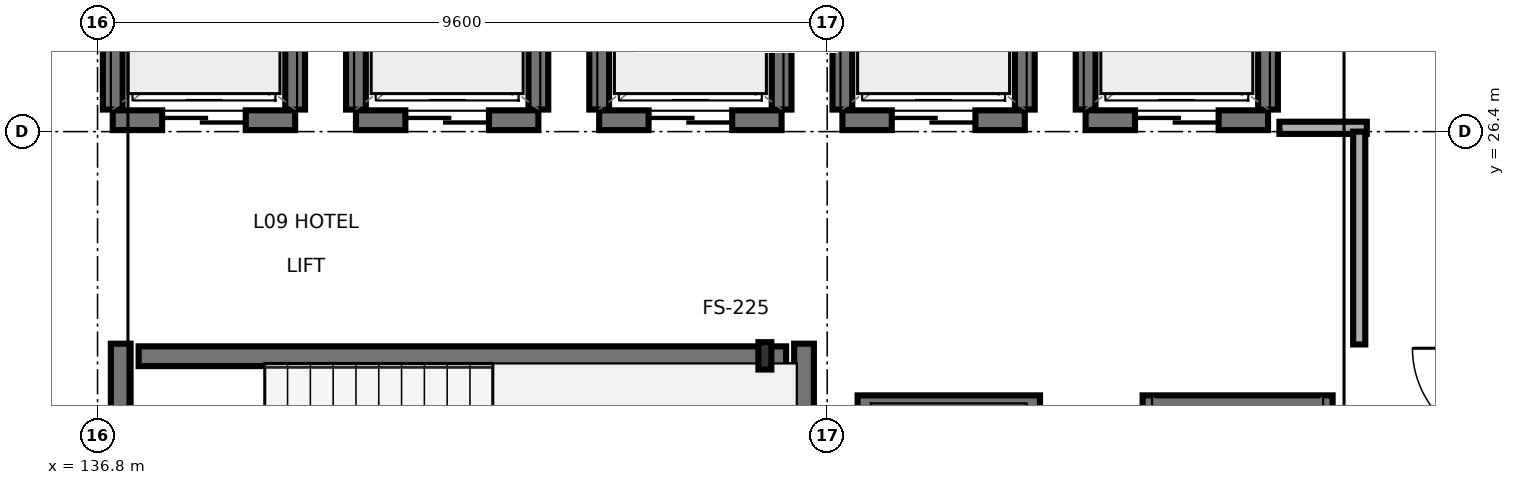
"""IFC4 building model, lengths in metres.
Left out: names, types, materials, properties, quantities, classifications, styles, units other than length and angle.
Written with IfcOpenShell. Run it as: python <this file> out.ifc"""

import sys

from ifc_helpers import new_model, si_unit, direction, frame, frame_2d, origin, origin_2d, place, context, subcontext, project, spatial, rectangle, i_section, extrude, element, fill, save


model = new_model("IFC4")
c1 = context("Model", 3, precision=1e-05, world=origin(), true_north=direction((0.0, 1.0)))
c2 = subcontext(c1, "Body", "Model", "MODEL_VIEW")
j1 = project(units=[si_unit("LENGTHUNIT", "METRE"), si_unit("PLANEANGLEUNIT", "RADIAN")], contexts=[c1])
p1 = place(None, origin())
s1 = spatial("IfcSite", under=j1, at=p1, CompositionType="ELEMENT")
p2 = place(p1, origin())
s2 = spatial("IfcBuilding", under=s1, at=p2, CompositionType="ELEMENT")
p3 = place(p2, frame((0.0, 0.0, 31.7)))
s3 = spatial("IfcBuildingStorey", under=s2, at=p3, CompositionType="ELEMENT", Elevation=31.7)
p4 = place(p3, frame((145.58, 23.45, 0.0), z_axis=(0.0, 0.0, 1.0), x_axis=(1.0, 0.0, 0.0)))
e1 = element("IfcColumn", 1, at=p4, inside=s3, PredefinedType="PILASTER", context=c2, shape_type="SweptSolid", body=[
    extrude(i_section(OverallWidth=0.17, OverallDepth=0.36, WebThickness=0.008, FlangeThickness=0.013, FilletRadius=0.018, at=origin_2d()), origin(), (0.0, 0.0, 1.0), 3.4),
])
p5 = place(p3, frame((137.105, 19.34, 0.0), z_axis=(0.0, 0.0, 1.0), x_axis=(0.0, 1.0, 0.0)))
e2 = element("IfcWall", 2, at=p5, inside=s3, PredefinedType="SHEAR", context=c2, shape_type="SweptSolid", body=[
    extrude(rectangle(XDim=4.27, YDim=0.26, at=frame_2d((2.135, 0.0))), origin(), (0.0, 0.0, 1.0), 3.17),
])
p6 = place(p5, frame((0.61, 0.0, 0.0)))
e3 = element("IfcOpeningElement", 3, at=p6, cuts=e2, PredefinedType="OPENING", context=c2, shape_type="SweptSolid", body=[
    extrude(rectangle(XDim=1.1, YDim=2.2, at=frame_2d((0.55, 1.1))), frame((0.0, 0.14, 0.0), z_axis=(0.0, -1.0, 0.0), x_axis=(1.0, 0.0, 0.0)), (0.0, 0.0, 1.0), 0.28),
])
p7 = place(p3, frame((146.095, 19.34, 0.0), z_axis=(0.0, 0.0, 1.0), x_axis=(0.0, 1.0, 0.0)))
e4 = element("IfcWall", 4, at=p7, inside=s3, PredefinedType="SHEAR", context=c2, shape_type="SweptSolid", body=[
    extrude(rectangle(XDim=4.27, YDim=0.26, at=frame_2d((2.135, 0.0))), origin(), (0.0, 0.0, 1.0), 3.17),
])
p8 = place(p3, frame((137.34, 23.445, 0.0), z_axis=(0.0, 0.0, 1.0), x_axis=(1.0, 0.0, 0.0)))
e5 = element("IfcWall", 5, at=p8, inside=s3, PredefinedType="SHEAR", context=c2, shape_type="SweptSolid", body=[
    extrude(rectangle(XDim=8.52, YDim=0.26, at=frame_2d((4.26, 0.0))), origin(), (0.0, 0.0, 1.0), 3.17),
])
p9 = place(p3, frame((137.0, 26.55, 0.0), z_axis=(0.0, 0.0, 1.0), x_axis=(1.0, 0.0, 0.0)))
e6 = element("IfcWall", 6, at=p9, inside=s3, PredefinedType="SHEAR", context=c2, shape_type="SweptSolid", body=[
    extrude(rectangle(XDim=2.4, YDim=0.26, at=frame_2d((1.2, 0.0))), origin(), (0.0, 0.0, 1.0), 2.705),
])
p10 = place(p9, frame((0.65, 0.0, 0.0)))
e7 = element("IfcOpeningElement", 7, at=p10, cuts=e6, PredefinedType="OPENING", context=c2, shape_type="SweptSolid", body=[
    extrude(rectangle(XDim=1.1, YDim=2.2, at=frame_2d((0.55, 1.1))), frame((0.0, 0.14, 0.0), z_axis=(0.0, -1.0, 0.0), x_axis=(1.0, 0.0, 0.0)), (0.0, 0.0, 1.0), 0.28),
])
for number, where, z_axis, x_axis in (
    (8, (137.0, 26.69, 0.0), (0.0, 0.0, 1.0), (0.0, 1.0, 0.0)),
    (9, (139.4, 26.69, 0.0), (0.0, 0.0, 1.0), (0.0, 1.0, 0.0)),
):
    element("IfcWall", number, at=place(p3, frame(where, z_axis=z_axis, x_axis=x_axis)), inside=s3, PredefinedType="SHEAR", context=c2, shape_type="SweptSolid", body=[
        extrude(rectangle(XDim=1.82, YDim=0.26, at=frame_2d((0.91, 0.0))), origin(), (0.0, 0.0, 1.0), 2.705),
    ])
p11 = place(p3, frame((140.2, 26.55, 0.0), z_axis=(0.0, 0.0, 1.0), x_axis=(1.0, 0.0, 0.0)))
e10 = element("IfcWall", 10, at=p11, inside=s3, PredefinedType="SHEAR", context=c2, shape_type="SweptSolid", body=[
    extrude(rectangle(XDim=2.4, YDim=0.26, at=frame_2d((1.2, 0.0))), origin(), (0.0, 0.0, 1.0), 3.17),
])
p12 = place(p11, frame((0.65, 0.0, 0.0)))
e11 = element("IfcOpeningElement", 11, at=p12, cuts=e10, PredefinedType="OPENING", context=c2, shape_type="SweptSolid", body=[
    extrude(rectangle(XDim=1.1, YDim=2.2, at=frame_2d((0.55, 1.1))), frame((0.0, 0.14, 0.0), z_axis=(0.0, -1.0, 0.0), x_axis=(1.0, 0.0, 0.0)), (0.0, 0.0, 1.0), 0.28),
])
for number, where, z_axis, x_axis in (
    (12, (140.2, 26.69, 0.0), (0.0, 0.0, 1.0), (0.0, 1.0, 0.0)),
    (13, (142.6, 26.69, 0.0), (0.0, 0.0, 1.0), (0.0, 1.0, 0.0)),
):
    element("IfcWall", number, at=place(p3, frame(where, z_axis=z_axis, x_axis=x_axis)), inside=s3, PredefinedType="SHEAR", context=c2, shape_type="SweptSolid", body=[
        extrude(rectangle(XDim=1.82, YDim=0.26, at=frame_2d((0.91, 0.0))), origin(), (0.0, 0.0, 1.0), 3.17),
    ])
p13 = place(p3, frame((143.4, 26.55, 0.0), z_axis=(0.0, 0.0, 1.0), x_axis=(1.0, 0.0, 0.0)))
e14 = element("IfcWall", 14, at=p13, inside=s3, PredefinedType="SHEAR", context=c2, shape_type="SweptSolid", body=[
    extrude(rectangle(XDim=2.4, YDim=0.26, at=frame_2d((1.2, 0.0))), origin(), (0.0, 0.0, 1.0), 3.17),
])
p14 = place(p13, frame((0.65, 0.0, 0.0)))
e15 = element("IfcOpeningElement", 15, at=p14, cuts=e14, PredefinedType="OPENING", context=c2, shape_type="SweptSolid", body=[
    extrude(rectangle(XDim=1.1, YDim=2.2, at=frame_2d((0.55, 1.1))), frame((0.0, 0.14, 0.0), z_axis=(0.0, -1.0, 0.0), x_axis=(1.0, 0.0, 0.0)), (0.0, 0.0, 1.0), 0.28),
])
for number, where, z_axis, x_axis in (
    (16, (143.4, 26.69, 0.0), (0.0, 0.0, 1.0), (0.0, 1.0, 0.0)),
    (17, (145.8, 26.69, 0.0), (0.0, 0.0, 1.0), (0.0, 1.0, 0.0)),
):
    element("IfcWall", number, at=place(p3, frame(where, z_axis=z_axis, x_axis=x_axis)), inside=s3, PredefinedType="SHEAR", context=c2, shape_type="SweptSolid", body=[
        extrude(rectangle(XDim=1.82, YDim=0.26, at=frame_2d((0.91, 0.0))), origin(), (0.0, 0.0, 1.0), 3.17),
    ])
p15 = place(p3, frame((146.6, 26.55, 0.0), z_axis=(0.0, 0.0, 1.0), x_axis=(1.0, 0.0, 0.0)))
e18 = element("IfcWall", 18, at=p15, inside=s3, PredefinedType="SHEAR", context=c2, shape_type="SweptSolid", body=[
    extrude(rectangle(XDim=2.4, YDim=0.26, at=frame_2d((1.2, 0.0))), origin(), (0.0, 0.0, 1.0), 3.17),
])
p16 = place(p15, frame((0.65, 0.0, 0.0)))
e19 = element("IfcOpeningElement", 19, at=p16, cuts=e18, PredefinedType="OPENING", context=c2, shape_type="SweptSolid", body=[
    extrude(rectangle(XDim=1.1, YDim=2.2, at=frame_2d((0.55, 1.1))), frame((0.0, 0.14, 0.0), z_axis=(0.0, -1.0, 0.0), x_axis=(1.0, 0.0, 0.0)), (0.0, 0.0, 1.0), 0.28),
])
for number, where, z_axis, x_axis in (
    (20, (146.6, 26.69, 0.0), (0.0, 0.0, 1.0), (0.0, 1.0, 0.0)),
    (21, (149.0, 26.69, 0.0), (0.0, 0.0, 1.0), (0.0, 1.0, 0.0)),
):
    element("IfcWall", number, at=place(p3, frame(where, z_axis=z_axis, x_axis=x_axis)), inside=s3, PredefinedType="SHEAR", context=c2, shape_type="SweptSolid", body=[
        extrude(rectangle(XDim=1.82, YDim=0.26, at=frame_2d((0.91, 0.0))), origin(), (0.0, 0.0, 1.0), 3.17),
    ])
p17 = place(p3, frame((149.8, 26.55, 0.0), z_axis=(0.0, 0.0, 1.0), x_axis=(1.0, 0.0, 0.0)))
e22 = element("IfcWall", 22, at=p17, inside=s3, PredefinedType="SHEAR", context=c2, shape_type="SweptSolid", body=[
    extrude(rectangle(XDim=2.4, YDim=0.26, at=frame_2d((1.2, 0.0))), origin(), (0.0, 0.0, 1.0), 3.17),
])
p18 = place(p17, frame((0.65, 0.0, 0.0)))
e23 = element("IfcOpeningElement", 23, at=p18, cuts=e22, PredefinedType="OPENING", context=c2, shape_type="SweptSolid", body=[
    extrude(rectangle(XDim=1.1, YDim=2.2, at=frame_2d((0.55, 1.1))), frame((0.0, 0.14, 0.0), z_axis=(0.0, -1.0, 0.0), x_axis=(1.0, 0.0, 0.0)), (0.0, 0.0, 1.0), 0.28),
])
for number, where, z_axis, x_axis in (
    (24, (149.8, 26.69, 0.0), (0.0, 0.0, 1.0), (0.0, 1.0, 0.0)),
    (25, (152.2, 26.69, 0.0), (0.0, 0.0, 1.0), (0.0, 1.0, 0.0)),
):
    element("IfcWall", number, at=place(p3, frame(where, z_axis=z_axis, x_axis=x_axis)), inside=s3, PredefinedType="SHEAR", context=c2, shape_type="SweptSolid", body=[
        extrude(rectangle(XDim=1.82, YDim=0.26, at=frame_2d((0.91, 0.0))), origin(), (0.0, 0.0, 1.0), 3.17),
    ])
p19 = place(p3, frame((146.8, 22.8, 0.0), z_axis=(0.0, 0.0, 1.0), x_axis=(1.0, 0.0, 0.0)))
e26 = element("IfcWall", 26, at=p19, inside=s3, PredefinedType="SHEAR", context=c2, shape_type="SweptSolid", body=[
    extrude(rectangle(XDim=2.4, YDim=0.26, at=frame_2d((1.2, 0.0))), origin(), (0.0, 0.0, 1.0), 3.17),
])
p20 = place(p3, frame((150.55, 22.8, 0.0), z_axis=(0.0, 0.0, 1.0), x_axis=(1.0, 0.0, 0.0)))
e27 = element("IfcWall", 27, at=p20, inside=s3, PredefinedType="SHEAR", context=c2, shape_type="SweptSolid", body=[
    extrude(rectangle(XDim=2.5, YDim=0.26, at=frame_2d((1.25, 0.0))), origin(), (0.0, 0.0, 1.0), 3.17),
])
p21 = place(p3, frame((152.35, 26.45, 0.0), z_axis=(0.0, 0.0, 1.0), x_axis=(1.0, 0.0, 0.0)))
e28 = element("IfcWall", 28, at=p21, inside=s3, PredefinedType="PARTITIONING", context=c2, shape_type="SweptSolid", body=[
    extrude(rectangle(XDim=1.15, YDim=0.16, at=frame_2d((0.575, 0.0))), origin(), (0.0, 0.0, 1.0), 3.17),
])
p22 = place(p3, frame((153.4, 23.6, 0.0), z_axis=(0.0, 0.0, 1.0), x_axis=(0.0, 1.0, 0.0)))
e29 = element("IfcWall", 29, at=p22, inside=s3, PredefinedType="PARTITIONING", context=c2, shape_type="SweptSolid", body=[
    extrude(rectangle(XDim=2.8, YDim=0.16, at=frame_2d((1.4, 0.0))), origin(), (0.0, 0.0, 1.0), 3.17),
])
p23 = place(p10, origin())
e30 = element("IfcDoor", 30, at=p23, inside=s3, OperationType="SLIDING_TO_LEFT", PredefinedType="DOOR", context=c2, shape_type="SweptSolid", body=[
    extrude(rectangle(XDim=1.1, YDim=2.2, at=frame_2d((0.55, 1.1))), frame((0.0, 0.025, 0.0), z_axis=(0.0, -1.0, 0.0), x_axis=(1.0, 0.0, 0.0)), (0.0, 0.0, 1.0), 0.05),
])
fill(e7, e30)
p24 = place(p12, origin())
e31 = element("IfcDoor", 31, at=p24, inside=s3, OperationType="SLIDING_TO_RIGHT", PredefinedType="DOOR", context=c2, shape_type="SweptSolid", body=[
    extrude(rectangle(XDim=1.1, YDim=2.2, at=frame_2d((0.55, 1.1))), frame((0.0, 0.025, 0.0), z_axis=(0.0, -1.0, 0.0), x_axis=(1.0, 0.0, 0.0)), (0.0, 0.0, 1.0), 0.05),
])
fill(e11, e31)
p25 = place(p14, origin())
e32 = element("IfcDoor", 32, at=p25, inside=s3, OperationType="SLIDING_TO_LEFT", PredefinedType="DOOR", context=c2, shape_type="SweptSolid", body=[
    extrude(rectangle(XDim=1.1, YDim=2.2, at=frame_2d((0.55, 1.1))), frame((0.0, 0.025, 0.0), z_axis=(0.0, -1.0, 0.0), x_axis=(1.0, 0.0, 0.0)), (0.0, 0.0, 1.0), 0.05),
])
fill(e15, e32)
p26 = place(p16, origin())
e33 = element("IfcDoor", 33, at=p26, inside=s3, OperationType="SLIDING_TO_RIGHT", PredefinedType="DOOR", context=c2, shape_type="SweptSolid", body=[
    extrude(rectangle(XDim=1.1, YDim=2.2, at=frame_2d((0.55, 1.1))), frame((0.0, 0.025, 0.0), z_axis=(0.0, -1.0, 0.0), x_axis=(1.0, 0.0, 0.0)), (0.0, 0.0, 1.0), 0.05),
])
fill(e19, e33)
p27 = place(p18, origin())
e34 = element("IfcDoor", 34, at=p27, inside=s3, OperationType="SLIDING_TO_LEFT", PredefinedType="DOOR", context=c2, shape_type="SweptSolid", body=[
    extrude(rectangle(XDim=1.1, YDim=2.2, at=frame_2d((0.55, 1.1))), frame((0.0, 0.025, 0.0), z_axis=(0.0, -1.0, 0.0), x_axis=(1.0, 0.0, 0.0)), (0.0, 0.0, 1.0), 0.05),
])
fill(e23, e34)
save(model, sys.argv[1])
